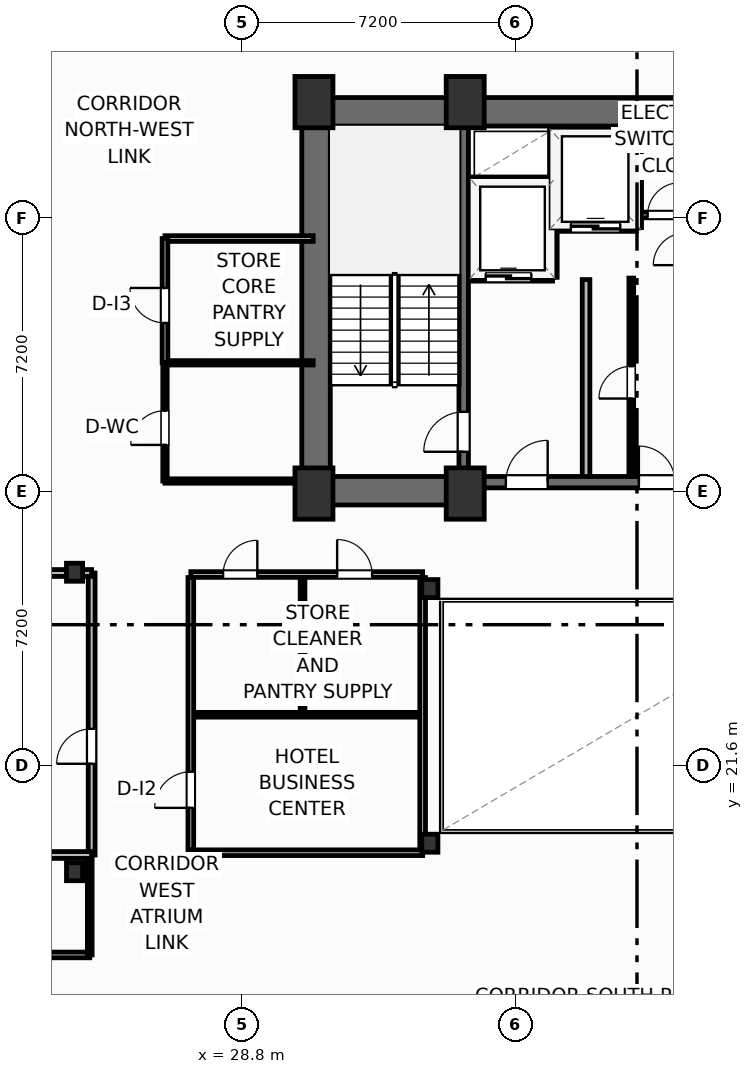
"""IFC4 building model, lengths in metres.
Left out: names, types, materials, properties, quantities, classifications, styles, units other than length and angle.
Written with IfcOpenShell. Run it as: python <this file> out.ifc"""

import sys

from ifc_helpers import new_model, si_unit, direction, frame, frame_2d, origin, origin_2d, place, context, subcontext, project, spatial, rectangle, i_section, extrude, element, fill, save


model = new_model("IFC4")
c1 = context("Model", 3, precision=1e-05, world=origin(), true_north=direction((0.0, 1.0)))
c2 = subcontext(c1, "Body", "Model", "MODEL_VIEW")
j1 = project(units=[si_unit("LENGTHUNIT", "METRE"), si_unit("PLANEANGLEUNIT", "RADIAN")], contexts=[c1])
p1 = place(None, origin())
s1 = spatial("IfcSite", under=j1, at=p1, CompositionType="ELEMENT")
p2 = place(p1, origin())
s2 = spatial("IfcBuilding", under=s1, at=p2, CompositionType="ELEMENT")
p3 = place(p2, frame((0.0, 0.0, 140.2)))
s3 = spatial("IfcBuildingStorey", under=s2, at=p3, CompositionType="ELEMENT", Elevation=140.2)
for number, where, z_axis, x_axis in (
    (1, (30.7, 28.75, 0.0), (0.0, 0.0, 1.0), (1.0, 0.0, 0.0)),
    (2, (34.68, 28.75, 0.0), (0.0, 0.0, 1.0), (1.0, 0.0, 0.0)),
    (3, (30.7, 39.05, 0.0), (0.0, 0.0, 1.0), (1.0, 0.0, 0.0)),
    (4, (34.68, 39.05, 0.0), (0.0, 0.0, 1.0), (1.0, 0.0, 0.0)),
):
    element("IfcColumn", number, at=place(p3, frame(where, z_axis=z_axis, x_axis=x_axis)), inside=s3, PredefinedType="COLUMN", context=c2, shape_type="SweptSolid", body=[
        extrude(rectangle(XDim=1.0, YDim=1.35, at=origin_2d()), origin(), (0.0, 0.0, 1.0), 3.7),
    ])
for number, where, z_axis, x_axis in (
    (5, (33.75, 19.55, 0.0), (0.0, 0.0, 1.0), (1.0, 0.0, 0.0)),
    (6, (33.75, 26.25, 0.0), (0.0, 0.0, 1.0), (1.0, 0.0, 0.0)),
    (7, (24.4, 18.8, 0.0), (0.0, 0.0, 1.0), (1.0, 0.0, 0.0)),
    (8, (24.4, 26.68, 0.0), (0.0, 0.0, 1.0), (1.0, 0.0, 0.0)),
):
    element("IfcColumn", number, at=place(p3, frame(where, z_axis=z_axis, x_axis=x_axis)), inside=s3, PredefinedType="COLUMN", context=c2, shape_type="SweptSolid", body=[
        extrude(i_section(OverallWidth=0.424, OverallDepth=0.474, WebThickness=0.048, FlangeThickness=0.077, FilletRadius=0.025, at=origin_2d()), origin(), (0.0, 0.0, 1.0), 3.7),
    ])
p4 = place(p3, frame((30.38, 38.795, 0.0), z_axis=(0.0, 0.0, 1.0), x_axis=(1.0, 0.0, 0.0)))
e9 = element("IfcWall", 9, at=p4, inside=s3, PredefinedType="SHEAR", context=c2, shape_type="SweptSolid", body=[
    extrude(rectangle(XDim=17.64, YDim=0.75, at=frame_2d((8.82, 0.0))), origin(), (0.0, 0.0, 1.0), 3.45),
])
p5 = place(p3, frame((30.755, 29.2, 0.0), z_axis=(0.0, 0.0, 1.0), x_axis=(0.0, 1.0, 0.0)))
e10 = element("IfcWall", 10, at=p5, inside=s3, PredefinedType="SHEAR", context=c2, shape_type="SweptSolid", body=[
    extrude(rectangle(XDim=9.22, YDim=0.75, at=frame_2d((4.61, 0.0))), origin(), (0.0, 0.0, 1.0), 3.45),
])
p6 = place(p3, frame((30.38, 28.825, 0.0), z_axis=(0.0, 0.0, 1.0), x_axis=(1.0, 0.0, 0.0)))
e11 = element("IfcWall", 11, at=p6, inside=s3, PredefinedType="SHEAR", context=c2, shape_type="SweptSolid", body=[
    extrude(rectangle(XDim=4.42, YDim=0.75, at=frame_2d((2.21, 0.0))), origin(), (0.0, 0.0, 1.0), 3.45),
])
p7 = place(p3, frame((34.8, 29.05, 0.0), z_axis=(0.0, 0.0, 1.0), x_axis=(1.0, 0.0, 0.0)))
e12 = element("IfcWall", 12, at=p7, inside=s3, PredefinedType="SHEAR", context=c2, shape_type="SweptSolid", body=[
    extrude(rectangle(XDim=8.8, YDim=0.3, at=frame_2d((4.4, 0.0))), origin(), (0.0, 0.0, 1.0), 3.45),
])
p8 = place(p7, frame((0.95, 0.0, 0.0)))
e13 = element("IfcOpeningElement", 13, at=p8, cuts=e12, PredefinedType="OPENING", context=c2, shape_type="SweptSolid", body=[
    extrude(rectangle(XDim=1.1, YDim=2.15, at=frame_2d((0.55, 1.075))), frame((0.0, 0.16, 0.0), z_axis=(0.0, -1.0, 0.0), x_axis=(1.0, 0.0, 0.0)), (0.0, 0.0, 1.0), 0.32),
])
p9 = place(p7, frame((6.75, 0.0, 0.0)))
e14 = element("IfcOpeningElement", 14, at=p9, cuts=e12, PredefinedType="OPENING", context=c2, shape_type="SweptSolid", body=[
    extrude(rectangle(XDim=1.1, YDim=2.15, at=frame_2d((0.55, 1.075))), frame((0.0, 0.16, 0.0), z_axis=(0.0, -1.0, 0.0), x_axis=(1.0, 0.0, 0.0)), (0.0, 0.0, 1.0), 0.32),
])
p10 = place(p7, frame((4.45, 0.0, 0.0)))
e15 = element("IfcOpeningElement", 15, at=p10, cuts=e12, PredefinedType="OPENING", context=c2, shape_type="SweptSolid", body=[
    extrude(rectangle(XDim=0.95, YDim=2.15, at=frame_2d((0.475, 1.075))), frame((0.0, 0.16, 0.0), z_axis=(0.0, -1.0, 0.0), x_axis=(1.0, 0.0, 0.0)), (0.0, 0.0, 1.0), 0.32),
])
p11 = place(p3, frame((34.64, 29.2, 0.0), z_axis=(0.0, 0.0, 1.0), x_axis=(0.0, 1.0, 0.0)))
e16 = element("IfcWall", 16, at=p11, inside=s3, PredefinedType="SHEAR", context=c2, shape_type="SweptSolid", body=[
    extrude(rectangle(XDim=9.22, YDim=0.25, at=frame_2d((4.61, 0.0))), origin(), (0.0, 0.0, 1.0), 3.45),
])
p12 = place(p11, frame((0.65, 0.0, 0.0)))
e17 = element("IfcOpeningElement", 17, at=p12, cuts=e16, PredefinedType="OPENING", context=c2, shape_type="SweptSolid", body=[
    extrude(rectangle(XDim=1.05, YDim=2.15, at=frame_2d((0.525, 1.075))), frame((0.0, 0.135, 0.0), z_axis=(0.0, -1.0, 0.0), x_axis=(1.0, 0.0, 0.0)), (0.0, 0.0, 1.0), 0.27),
])
p13 = place(p3, frame((5.0, 16.61, 0.0), z_axis=(0.0, 0.0, 1.0), x_axis=(1.0, 0.0, 0.0)))
e18 = element("IfcWall", 18, at=p13, inside=s3, PredefinedType="PARTITIONING", context=c2, shape_type="SweptSolid", body=[
    extrude(rectangle(XDim=19.8, YDim=0.15, at=frame_2d((9.9, 0.0))), origin(), (0.0, 0.0, 1.0), 3.45),
])
p14 = place(p13, frame((12.485, 0.0, 0.0)))
e19 = element("IfcOpeningElement", 19, at=p14, cuts=e18, PredefinedType="OPENING", context=c2, shape_type="SweptSolid", body=[
    extrude(rectangle(XDim=0.92, YDim=2.05, at=frame_2d((0.46, 1.025))), frame((0.0, 0.085, 0.0), z_axis=(0.0, -1.0, 0.0), x_axis=(1.0, 0.0, 0.0)), (0.0, 0.0, 1.0), 0.17),
])
p15 = place(p3, frame((24.8, 16.61, 0.0), z_axis=(0.0, 0.0, 1.0), x_axis=(0.0, 1.0, 0.0)))
e20 = element("IfcWall", 20, at=p15, inside=s3, PredefinedType="PARTITIONING", context=c2, shape_type="SweptSolid", body=[
    extrude(rectangle(XDim=2.63, YDim=0.125, at=frame_2d((1.315, 0.0))), origin(), (0.0, 0.0, 1.0), 2.662),
])
p16 = place(p3, frame((24.85, 19.24, 0.0), z_axis=(0.0, 0.0, 1.0), x_axis=(0.0, 1.0, 0.0)))
e21 = element("IfcWall", 21, at=p16, inside=s3, PredefinedType="PARTITIONING", context=c2, shape_type="SweptSolid", body=[
    extrude(rectangle(XDim=7.42, YDim=0.18, at=frame_2d((3.71, 0.0))), origin(), (0.0, 0.0, 1.0), 3.45),
])
p17 = place(p16, frame((2.4, 0.0, 0.0)))
e22 = element("IfcOpeningElement", 22, at=p17, cuts=e21, PredefinedType="OPENING", context=c2, shape_type="SweptSolid", body=[
    extrude(rectangle(XDim=0.92, YDim=2.05, at=frame_2d((0.46, 1.025))), frame((0.0, 0.1, 0.0), z_axis=(0.0, -1.0, 0.0), x_axis=(1.0, 0.0, 0.0)), (0.0, 0.0, 1.0), 0.2),
])
p18 = place(p3, frame((19.2, 19.24, 0.0), z_axis=(0.0, 0.0, 1.0), x_axis=(1.0, 0.0, 0.0)))
e23 = element("IfcWall", 23, at=p18, inside=s3, PredefinedType="PARTITIONING", context=c2, shape_type="SweptSolid", body=[
    extrude(rectangle(XDim=5.65, YDim=0.18, at=frame_2d((2.825, 0.0))), origin(), (0.0, 0.0, 1.0), 3.45),
])
p19 = place(p3, frame((2.073, 26.66, 0.0), z_axis=(0.0, 0.0, 1.0), x_axis=(1.0, 0.0, 0.0)))
e24 = element("IfcWall", 24, at=p19, inside=s3, PredefinedType="PARTITIONING", context=c2, shape_type="SweptSolid", body=[
    extrude(rectangle(XDim=22.777, YDim=0.18, at=frame_2d((11.388, 0.0))), origin(), (0.0, 0.0, 1.0), 2.662),
])
p20 = place(p3, frame((37.86, 29.2, 0.0), z_axis=(0.0, 0.0, 1.0), x_axis=(0.0, 1.0, 0.0)))
e25 = element("IfcWall", 25, at=p20, inside=s3, PredefinedType="PARTITIONING", context=c2, shape_type="SweptSolid", body=[
    extrude(rectangle(XDim=5.18, YDim=0.2, at=frame_2d((2.59, 0.0))), origin(), (0.0, 0.0, 1.0), 3.45),
])
p21 = place(p3, frame((34.8, 34.44, 0.0), z_axis=(0.0, 0.0, 1.0), x_axis=(1.0, 0.0, 0.0)))
e26 = element("IfcWall", 26, at=p21, inside=s3, PredefinedType="PARTITIONING", context=c2, shape_type="SweptSolid", body=[
    extrude(rectangle(XDim=2.18, YDim=0.2, at=frame_2d((1.09, 0.0))), origin(), (0.0, 0.0, 1.0), 3.45),
])
p22 = place(p21, frame((0.42, 0.0, 0.0)))
e27 = element("IfcOpeningElement", 27, at=p22, cuts=e26, PredefinedType="OPENING", context=c2, shape_type="SweptSolid", body=[
    extrude(rectangle(XDim=1.2, YDim=2.2, at=frame_2d((0.6, 1.1))), frame((0.0, 0.11, 0.0), z_axis=(0.0, -1.0, 0.0), x_axis=(1.0, 0.0, 0.0)), (0.0, 0.0, 1.0), 0.22),
])
p23 = place(p3, frame((34.8, 36.98, 0.0), z_axis=(0.0, 0.0, 1.0), x_axis=(1.0, 0.0, 0.0)))
e28 = element("IfcWall", 28, at=p23, inside=s3, PredefinedType="PARTITIONING", context=c2, shape_type="SweptSolid", body=[
    extrude(rectangle(XDim=2.18, YDim=0.2, at=frame_2d((1.09, 0.0))), origin(), (0.0, 0.0, 1.0), 3.45),
])
p24 = place(p3, frame((37.0, 34.44, 0.0), z_axis=(0.0, 0.0, 1.0), x_axis=(0.0, 1.0, 0.0)))
e29 = element("IfcWall", 29, at=p24, inside=s3, PredefinedType="PARTITIONING", context=c2, shape_type="SweptSolid", body=[
    extrude(rectangle(XDim=3.9, YDim=0.2, at=frame_2d((1.95, 0.0))), origin(), (0.0, 0.0, 1.0), 3.45),
])
p25 = place(p3, frame((37.06, 35.75, 0.0), z_axis=(0.0, 0.0, 1.0), x_axis=(1.0, 0.0, 0.0)))
e30 = element("IfcWall", 30, at=p25, inside=s3, PredefinedType="PARTITIONING", context=c2, shape_type="SweptSolid", body=[
    extrude(rectangle(XDim=2.12, YDim=0.2, at=frame_2d((1.06, 0.0))), origin(), (0.0, 0.0, 1.0), 3.45),
])
p26 = place(p25, frame((0.4, 0.0, 0.0)))
e31 = element("IfcOpeningElement", 31, at=p26, cuts=e30, PredefinedType="OPENING", context=c2, shape_type="SweptSolid", body=[
    extrude(rectangle(XDim=1.3, YDim=2.2, at=frame_2d((0.65, 1.1))), frame((0.0, 0.11, 0.0), z_axis=(0.0, -1.0, 0.0), x_axis=(1.0, 0.0, 0.0)), (0.0, 0.0, 1.0), 0.22),
])
p27 = place(p3, frame((39.22, 35.75, 0.0), z_axis=(0.0, 0.0, 1.0), x_axis=(0.0, 1.0, 0.0)))
e32 = element("IfcWall", 32, at=p27, inside=s3, PredefinedType="PARTITIONING", context=c2, shape_type="SweptSolid", body=[
    extrude(rectangle(XDim=2.59, YDim=0.2, at=frame_2d((1.295, 0.0))), origin(), (0.0, 0.0, 1.0), 3.45),
])
p28 = place(p3, frame((39.3, 36.08, 0.0), z_axis=(0.0, 0.0, 1.0), x_axis=(1.0, 0.0, 0.0)))
e33 = element("IfcWall", 33, at=p28, inside=s3, PredefinedType="PARTITIONING", context=c2, shape_type="SweptSolid", body=[
    extrude(rectangle(XDim=2.02, YDim=0.15, at=frame_2d((1.01, 0.0))), origin(), (0.0, 0.0, 1.0), 3.45),
])
p29 = place(p28, frame((0.18, 0.0, 0.0)))
e34 = element("IfcOpeningElement", 34, at=p29, cuts=e33, PredefinedType="OPENING", context=c2, shape_type="SweptSolid", body=[
    extrude(rectangle(XDim=0.85, YDim=2.05, at=frame_2d((0.425, 1.025))), frame((0.0, 0.085, 0.0), z_axis=(0.0, -1.0, 0.0), x_axis=(1.0, 0.0, 0.0)), (0.0, 0.0, 1.0), 0.17),
])
p30 = place(p3, frame((39.05, 29.2, 0.0), z_axis=(0.0, 0.0, 1.0), x_axis=(0.0, 1.0, 0.0)))
e35 = element("IfcWall", 35, at=p30, inside=s3, PredefinedType="PARTITIONING", context=c2, shape_type="SweptSolid", body=[
    extrude(rectangle(XDim=5.22, YDim=0.125, at=frame_2d((2.61, 0.0))), origin(), (0.0, 0.0, 1.0), 3.45),
])
p31 = place(p30, frame((2.05, 0.0, 0.0)))
e36 = element("IfcOpeningElement", 36, at=p31, cuts=e35, PredefinedType="OPENING", context=c2, shape_type="SweptSolid", body=[
    extrude(rectangle(XDim=0.85, YDim=2.05, at=frame_2d((0.425, 1.025))), frame((0.0, 0.073, 0.0), z_axis=(0.0, -1.0, 0.0), x_axis=(1.0, 0.0, 0.0)), (0.0, 0.0, 1.0), 0.145),
])
p32 = place(p3, frame((27.46, 19.3, 0.0), z_axis=(0.0, 0.0, 1.0), x_axis=(1.0, 0.0, 0.0)))
e37 = element("IfcWall", 37, at=p32, inside=s3, PredefinedType="PARTITIONING", context=c2, shape_type="SweptSolid", body=[
    extrude(rectangle(XDim=6.1, YDim=0.15, at=frame_2d((3.05, 0.0))), origin(), (0.0, 0.0, 1.0), 2.662),
])
p33 = place(p3, frame((27.46, 26.62, 0.0), z_axis=(0.0, 0.0, 1.0), x_axis=(1.0, 0.0, 0.0)))
e38 = element("IfcWall", 38, at=p33, inside=s3, PredefinedType="PARTITIONING", context=c2, shape_type="SweptSolid", body=[
    extrude(rectangle(XDim=6.1, YDim=0.15, at=frame_2d((3.05, 0.0))), origin(), (0.0, 0.0, 1.0), 2.662),
])
p34 = place(p33, frame((0.85, 0.0, 0.0)))
e39 = element("IfcOpeningElement", 39, at=p34, cuts=e38, PredefinedType="OPENING", context=c2, shape_type="SweptSolid", body=[
    extrude(rectangle(XDim=0.9, YDim=2.05, at=frame_2d((0.45, 1.025))), frame((0.0, 0.085, 0.0), z_axis=(0.0, -1.0, 0.0), x_axis=(1.0, 0.0, 0.0)), (0.0, 0.0, 1.0), 0.17),
])
p35 = place(p33, frame((3.85, 0.0, 0.0)))
e40 = element("IfcOpeningElement", 40, at=p35, cuts=e38, PredefinedType="OPENING", context=c2, shape_type="SweptSolid", body=[
    extrude(rectangle(XDim=0.92, YDim=2.05, at=frame_2d((0.46, 1.025))), frame((0.0, 0.085, 0.0), z_axis=(0.0, -1.0, 0.0), x_axis=(1.0, 0.0, 0.0)), (0.0, 0.0, 1.0), 0.17),
])
p36 = place(p3, frame((27.52, 22.93, 0.0), z_axis=(0.0, 0.0, 1.0), x_axis=(1.0, 0.0, 0.0)))
e41 = element("IfcWall", 41, at=p36, inside=s3, PredefinedType="PARTITIONING", context=c2, shape_type="SweptSolid", body=[
    extrude(rectangle(XDim=6.0, YDim=0.125, at=frame_2d((3.0, 0.0))), origin(), (0.0, 0.0, 1.0), 3.45),
])
p37 = place(p3, frame((30.4, 23.0, 0.0), z_axis=(0.0, 0.0, 1.0), x_axis=(0.0, 1.0, 0.0)))
e42 = element("IfcWall", 42, at=p37, inside=s3, PredefinedType="PARTITIONING", context=c2, shape_type="SweptSolid", body=[
    extrude(rectangle(XDim=3.54, YDim=0.125, at=frame_2d((1.77, 0.0))), origin(), (0.0, 0.0, 1.0), 3.45),
])
p38 = place(p3, frame((27.46, 19.38, 0.0), z_axis=(0.0, 0.0, 1.0), x_axis=(0.0, 1.0, 0.0)))
e43 = element("IfcWall", 43, at=p38, inside=s3, PredefinedType="PARTITIONING", context=c2, shape_type="SweptSolid", body=[
    extrude(rectangle(XDim=7.16, YDim=0.15, at=frame_2d((3.58, 0.0))), origin(), (0.0, 0.0, 1.0), 3.45),
])
p39 = place(p38, frame((1.1, 0.0, 0.0)))
e44 = element("IfcOpeningElement", 44, at=p39, cuts=e43, PredefinedType="OPENING", context=c2, shape_type="SweptSolid", body=[
    extrude(rectangle(XDim=0.95, YDim=2.05, at=frame_2d((0.475, 1.025))), frame((0.0, 0.085, 0.0), z_axis=(0.0, -1.0, 0.0), x_axis=(1.0, 0.0, 0.0)), (0.0, 0.0, 1.0), 0.17),
])
p40 = place(p3, frame((33.56, 19.38, 0.0), z_axis=(0.0, 0.0, 1.0), x_axis=(0.0, 1.0, 0.0)))
e45 = element("IfcWall", 45, at=p40, inside=s3, PredefinedType="PARTITIONING", context=c2, shape_type="SweptSolid", body=[
    extrude(rectangle(XDim=7.16, YDim=0.15, at=frame_2d((3.58, 0.0))), origin(), (0.0, 0.0, 1.0), 2.824),
])
p41 = place(p3, frame((26.8, 32.19, 0.0), z_axis=(0.0, 0.0, 1.0), x_axis=(1.0, 0.0, 0.0)))
e46 = element("IfcWall", 46, at=p41, inside=s3, PredefinedType="PARTITIONING", context=c2, shape_type="SweptSolid", body=[
    extrude(rectangle(XDim=3.88, YDim=0.115, at=frame_2d((1.94, 0.0))), origin(), (0.0, 0.0, 1.0), 3.45),
])
p42 = place(p3, frame((26.78, 29.08, 0.0), z_axis=(0.0, 0.0, 1.0), x_axis=(1.0, 0.0, 0.0)))
e47 = element("IfcWall", 47, at=p42, inside=s3, PredefinedType="PARTITIONING", context=c2, shape_type="SweptSolid", body=[
    extrude(rectangle(XDim=3.6, YDim=0.115, at=frame_2d((1.8, 0.0))), origin(), (0.0, 0.0, 1.0), 3.45),
])
p43 = place(p3, frame((26.78, 35.46, 0.0), z_axis=(0.0, 0.0, 1.0), x_axis=(1.0, 0.0, 0.0)))
e48 = element("IfcWall", 48, at=p43, inside=s3, PredefinedType="PARTITIONING", context=c2, shape_type="SweptSolid", body=[
    extrude(rectangle(XDim=3.9, YDim=0.15, at=frame_2d((1.95, 0.0))), origin(), (0.0, 0.0, 1.0), 3.45),
])
p44 = place(p3, frame((26.78, 29.08, 0.0), z_axis=(0.0, 0.0, 1.0), x_axis=(0.0, 1.0, 0.0)))
e49 = element("IfcWall", 49, at=p44, inside=s3, PredefinedType="PARTITIONING", context=c2, shape_type="SweptSolid", body=[
    extrude(rectangle(XDim=3.11, YDim=0.115, at=frame_2d((1.555, 0.0))), origin(), (0.0, 0.0, 1.0), 3.45),
])
p45 = place(p44, frame((0.95, 0.0, 0.0)))
e50 = element("IfcOpeningElement", 50, at=p45, cuts=e49, PredefinedType="OPENING", context=c2, shape_type="SweptSolid", body=[
    extrude(rectangle(XDim=0.9, YDim=2.05, at=frame_2d((0.45, 1.025))), frame((0.0, 0.067, 0.0), z_axis=(0.0, -1.0, 0.0), x_axis=(1.0, 0.0, 0.0)), (0.0, 0.0, 1.0), 0.135),
])
p46 = place(p3, frame((26.78, 32.19, 0.0), z_axis=(0.0, 0.0, 1.0), x_axis=(0.0, 1.0, 0.0)))
e51 = element("IfcWall", 51, at=p46, inside=s3, PredefinedType="PARTITIONING", context=c2, shape_type="SweptSolid", body=[
    extrude(rectangle(XDim=3.27, YDim=0.15, at=frame_2d((1.635, 0.0))), origin(), (0.0, 0.0, 1.0), 3.45),
])
p47 = place(p46, frame((1.05, 0.0, 0.0)))
e52 = element("IfcOpeningElement", 52, at=p47, cuts=e51, PredefinedType="OPENING", context=c2, shape_type="SweptSolid", body=[
    extrude(rectangle(XDim=0.92, YDim=2.05, at=frame_2d((0.46, 1.025))), frame((0.0, 0.085, 0.0), z_axis=(0.0, -1.0, 0.0), x_axis=(1.0, 0.0, 0.0)), (0.0, 0.0, 1.0), 0.17),
])
p48 = place(p17, origin())
e53 = element("IfcDoor", 53, at=p48, inside=s3, OperationType="SINGLE_SWING_LEFT", PredefinedType="DOOR", context=c2, shape_type="SweptSolid", body=[
    extrude(rectangle(XDim=0.92, YDim=2.05, at=frame_2d((0.46, 1.025))), frame((0.0, 0.025, 0.0), z_axis=(0.0, -1.0, 0.0), x_axis=(1.0, 0.0, 0.0)), (0.0, 0.0, 1.0), 0.05),
])
fill(e22, e53)
p49 = place(p12, origin())
e54 = element("IfcDoor", 54, at=p49, inside=s3, OperationType="SINGLE_SWING_LEFT", PredefinedType="DOOR", context=c2, shape_type="SweptSolid", body=[
    extrude(rectangle(XDim=1.05, YDim=2.15, at=frame_2d((0.525, 1.075))), frame((0.0, 0.025, 0.0), z_axis=(0.0, -1.0, 0.0), x_axis=(1.0, 0.0, 0.0)), (0.0, 0.0, 1.0), 0.05),
])
fill(e17, e54)
p50 = place(p8, origin())
e55 = element("IfcDoor", 55, at=p50, inside=s3, OperationType="SINGLE_SWING_RIGHT", PredefinedType="DOOR", context=c2, shape_type="SweptSolid", body=[
    extrude(rectangle(XDim=1.1, YDim=2.15, at=frame_2d((0.55, 1.075))), frame((0.0, 0.025, 0.0), z_axis=(0.0, -1.0, 0.0), x_axis=(1.0, 0.0, 0.0)), (0.0, 0.0, 1.0), 0.05),
])
fill(e13, e55)
p51 = place(p22, origin())
e56 = element("IfcDoor", 56, at=p51, inside=s3, OperationType="SLIDING_TO_LEFT", PredefinedType="DOOR", context=c2, shape_type="SweptSolid", body=[
    extrude(rectangle(XDim=1.2, YDim=2.2, at=frame_2d((0.6, 1.1))), frame((0.0, 0.025, 0.0), z_axis=(0.0, -1.0, 0.0), x_axis=(1.0, 0.0, 0.0)), (0.0, 0.0, 1.0), 0.05),
])
fill(e27, e56)
p52 = place(p26, origin())
e57 = element("IfcDoor", 57, at=p52, inside=s3, OperationType="SLIDING_TO_LEFT", PredefinedType="DOOR", context=c2, shape_type="SweptSolid", body=[
    extrude(rectangle(XDim=1.3, YDim=2.2, at=frame_2d((0.65, 1.1))), frame((0.0, 0.025, 0.0), z_axis=(0.0, -1.0, 0.0), x_axis=(1.0, 0.0, 0.0)), (0.0, 0.0, 1.0), 0.05),
])
fill(e31, e57)
p53 = place(p29, origin())
e58 = element("IfcDoor", 58, at=p53, inside=s3, OperationType="SINGLE_SWING_RIGHT", PredefinedType="DOOR", context=c2, shape_type="SweptSolid", body=[
    extrude(rectangle(XDim=0.85, YDim=2.05, at=frame_2d((0.425, 1.025))), frame((0.0, 0.025, 0.0), z_axis=(0.0, -1.0, 0.0), x_axis=(1.0, 0.0, 0.0)), (0.0, 0.0, 1.0), 0.05),
])
fill(e34, e58)
p54 = place(p31, origin())
e59 = element("IfcDoor", 59, at=p54, inside=s3, OperationType="SINGLE_SWING_LEFT", PredefinedType="DOOR", context=c2, shape_type="SweptSolid", body=[
    extrude(rectangle(XDim=0.85, YDim=2.05, at=frame_2d((0.425, 1.025))), frame((0.0, 0.025, 0.0), z_axis=(0.0, -1.0, 0.0), x_axis=(1.0, 0.0, 0.0)), (0.0, 0.0, 1.0), 0.05),
])
fill(e36, e59)
p55 = place(p10, origin())
e60 = element("IfcDoor", 60, at=p55, inside=s3, OperationType="SINGLE_SWING_LEFT", PredefinedType="DOOR", context=c2, shape_type="SweptSolid", body=[
    extrude(rectangle(XDim=0.95, YDim=2.15, at=frame_2d((0.475, 1.075))), frame((0.0, 0.025, 0.0), z_axis=(0.0, -1.0, 0.0), x_axis=(1.0, 0.0, 0.0)), (0.0, 0.0, 1.0), 0.05),
])
fill(e15, e60)
p56 = place(p34, origin())
e61 = element("IfcDoor", 61, at=p56, inside=s3, OperationType="SINGLE_SWING_RIGHT", PredefinedType="DOOR", context=c2, shape_type="SweptSolid", body=[
    extrude(rectangle(XDim=0.9, YDim=2.05, at=frame_2d((0.45, 1.025))), frame((0.0, 0.025, 0.0), z_axis=(0.0, -1.0, 0.0), x_axis=(1.0, 0.0, 0.0)), (0.0, 0.0, 1.0), 0.05),
])
fill(e39, e61)
p57 = place(p35, origin())
e62 = element("IfcDoor", 62, at=p57, inside=s3, OperationType="SINGLE_SWING_LEFT", PredefinedType="DOOR", context=c2, shape_type="SweptSolid", body=[
    extrude(rectangle(XDim=0.92, YDim=2.05, at=frame_2d((0.46, 1.025))), frame((0.0, 0.025, 0.0), z_axis=(0.0, -1.0, 0.0), x_axis=(1.0, 0.0, 0.0)), (0.0, 0.0, 1.0), 0.05),
])
fill(e40, e62)
p58 = place(p39, origin())
e63 = element("IfcDoor", 63, at=p58, inside=s3, OperationType="SINGLE_SWING_LEFT", PredefinedType="DOOR", context=c2, shape_type="SweptSolid", body=[
    extrude(rectangle(XDim=0.95, YDim=2.05, at=frame_2d((0.475, 1.025))), frame((0.0, 0.025, 0.0), z_axis=(0.0, -1.0, 0.0), x_axis=(1.0, 0.0, 0.0)), (0.0, 0.0, 1.0), 0.05),
])
fill(e44, e63)
p59 = place(p45, origin())
e64 = element("IfcDoor", 64, at=p59, inside=s3, OperationType="SINGLE_SWING_LEFT", PredefinedType="DOOR", context=c2, shape_type="SweptSolid", body=[
    extrude(rectangle(XDim=0.9, YDim=2.05, at=frame_2d((0.45, 1.025))), frame((0.0, 0.025, 0.0), z_axis=(0.0, -1.0, 0.0), x_axis=(1.0, 0.0, 0.0)), (0.0, 0.0, 1.0), 0.05),
])
fill(e50, e64)
p60 = place(p47, origin())
e65 = element("IfcDoor", 65, at=p60, inside=s3, OperationType="SINGLE_SWING_RIGHT", PredefinedType="DOOR", context=c2, shape_type="SweptSolid", body=[
    extrude(rectangle(XDim=0.92, YDim=2.05, at=frame_2d((0.46, 1.025))), frame((0.0, 0.025, 0.0), z_axis=(0.0, -1.0, 0.0), x_axis=(1.0, 0.0, 0.0)), (0.0, 0.0, 1.0), 0.05),
])
fill(e52, e65)
save(model, sys.argv[1])
